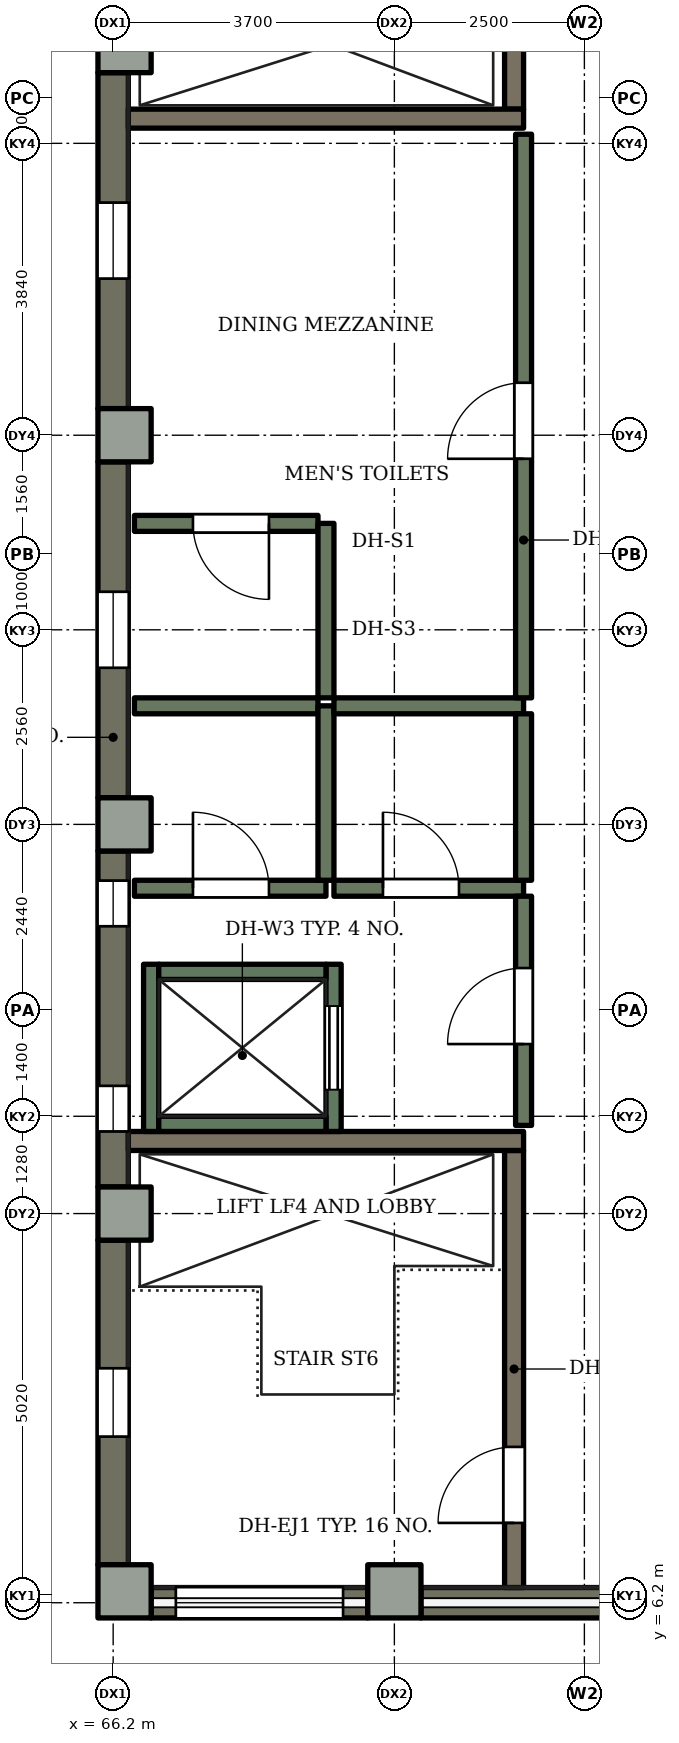
"""IFC4 building model, lengths in metres.
Left out: names, types, materials, properties, quantities, classifications, styles, units other than length and angle.
Written with IfcOpenShell. Run it as: python <this file> out.ifc"""

import sys

from ifc_helpers import new_model, si_unit, direction, frame, frame_2d, origin, origin_2d, place, context, subcontext, project, spatial, rectangle, extrude, element, fill, save


model = new_model("IFC4")
c1 = context("Model", 3, precision=1e-05, world=origin(), true_north=direction((0.0, 1.0)))
c2 = subcontext(c1, "Body", "Model", "MODEL_VIEW")
j1 = project(units=[si_unit("LENGTHUNIT", "METRE"), si_unit("PLANEANGLEUNIT", "RADIAN")], contexts=[c1])
p1 = place(None, origin())
s1 = spatial("IfcSite", under=j1, at=p1, CompositionType="ELEMENT")
p2 = place(p1, origin())
s2 = spatial("IfcBuilding", under=s1, at=p2, CompositionType="ELEMENT")
p3 = place(p2, frame((0.0, 0.0, 4.2)))
s3 = spatial("IfcBuildingStorey", under=s2, at=p3, CompositionType="ELEMENT", Elevation=4.2)
p4 = place(p3, frame((66.35, 6.35, 0.0), z_axis=(0.0, 0.0, 1.0), x_axis=(1.0, 0.0, 0.0)))
e1 = element("IfcColumn", 1, at=p4, inside=s3, PredefinedType="COLUMN", context=c2, shape_type="SweptSolid", body=[
    extrude(rectangle(XDim=0.7, YDim=0.7, at=origin_2d()), origin(), (0.0, 0.0, 1.0), 4.2),
])
p5 = place(p3, frame((69.9, 6.35, 0.0), z_axis=(0.0, 0.0, 1.0), x_axis=(1.0, 0.0, 0.0)))
e2 = element("IfcColumn", 2, at=p5, inside=s3, PredefinedType="COLUMN", context=c2, shape_type="SweptSolid", body=[
    extrude(rectangle(XDim=0.7, YDim=0.7, at=origin_2d()), origin(), (0.0, 0.0, 1.0), 3.3),
])
for number, where, z_axis, x_axis in (
    (3, (66.35, 11.32, 0.0), (0.0, 0.0, 1.0), (1.0, 0.0, 0.0)),
    (4, (66.35, 16.44, 0.0), (0.0, 0.0, 1.0), (1.0, 0.0, 0.0)),
    (5, (66.35, 21.56, 0.0), (0.0, 0.0, 1.0), (1.0, 0.0, 0.0)),
    (6, (66.35, 26.68, 0.0), (0.0, 0.0, 1.0), (1.0, 0.0, 0.0)),
):
    element("IfcColumn", number, at=place(p3, frame(where, z_axis=z_axis, x_axis=x_axis)), inside=s3, PredefinedType="COLUMN", context=c2, shape_type="SweptSolid", body=[
        extrude(rectangle(XDim=0.7, YDim=0.7, at=origin_2d()), origin(), (0.0, 0.0, 1.0), 4.2),
    ])
p6 = place(p3, frame((69.55, 6.2, 0.0), z_axis=(0.0, 0.0, 1.0), x_axis=(-1.0, 0.0, 0.0)))
e7 = element("IfcWall", 7, at=p6, inside=s3, PredefinedType="SOLIDWALL", context=c2, shape_type="SweptSolid", body=[
    extrude(rectangle(XDim=2.85, YDim=0.4, at=frame_2d((1.425, 0.0))), origin(), (0.0, 0.0, 1.0), 3.3),
])
p7 = place(p6, frame((0.325, 0.0, 0.6)))
e8 = element("IfcOpeningElement", 8, at=p7, cuts=e7, PredefinedType="OPENING", context=c2, shape_type="SweptSolid", body=[
    extrude(rectangle(XDim=2.2, YDim=2.4, at=frame_2d((1.1, 1.2))), frame((0.0, 0.21, 0.0), z_axis=(0.0, -1.0, 0.0), x_axis=(1.0, 0.0, 0.0)), (0.0, 0.0, 1.0), 0.42),
])
p8 = place(p3, frame((73.25, 6.2, 0.0), z_axis=(0.0, 0.0, 1.0), x_axis=(-1.0, 0.0, 0.0)))
e9 = element("IfcWall", 9, at=p8, inside=s3, PredefinedType="SOLIDWALL", context=c2, shape_type="SweptSolid", body=[
    extrude(rectangle(XDim=3.0, YDim=0.4, at=frame_2d((1.5, 0.0))), origin(), (0.0, 0.0, 1.0), 3.3),
])
p9 = place(p3, frame((66.2, 6.7, 0.0), z_axis=(0.0, 0.0, 1.0), x_axis=(0.0, 1.0, 0.0)))
e10 = element("IfcWall", 10, at=p9, inside=s3, PredefinedType="SOLIDWALL", context=c2, shape_type="SweptSolid", body=[
    extrude(rectangle(XDim=4.27, YDim=0.4, at=frame_2d((2.135, 0.0))), origin(), (0.0, 0.0, 1.0), 4.2),
])
p10 = place(p9, frame((1.685, 0.0, 0.9)))
e11 = element("IfcOpeningElement", 11, at=p10, cuts=e10, PredefinedType="OPENING", context=c2, shape_type="SweptSolid", body=[
    extrude(rectangle(XDim=0.9, YDim=1.8, at=frame_2d((0.45, 0.9))), frame((0.0, 0.21, 0.0), z_axis=(0.0, -1.0, 0.0), x_axis=(1.0, 0.0, 0.0)), (0.0, 0.0, 1.0), 0.42),
])
p11 = place(p3, frame((66.2, 11.67, 0.0), z_axis=(0.0, 0.0, 1.0), x_axis=(0.0, 1.0, 0.0)))
e12 = element("IfcWall", 12, at=p11, inside=s3, PredefinedType="SOLIDWALL", context=c2, shape_type="SweptSolid", body=[
    extrude(rectangle(XDim=4.42, YDim=0.4, at=frame_2d((2.21, 0.0))), origin(), (0.0, 0.0, 1.0), 4.2),
])
p12 = place(p11, frame((0.73, 0.0, 1.5)))
e13 = element("IfcOpeningElement", 13, at=p12, cuts=e12, PredefinedType="OPENING", context=c2, shape_type="SweptSolid", body=[
    extrude(rectangle(XDim=0.6, YDim=1.2, at=frame_2d((0.3, 0.6))), frame((0.0, 0.21, 0.0), z_axis=(0.0, -1.0, 0.0), x_axis=(1.0, 0.0, 0.0)), (0.0, 0.0, 1.0), 0.42),
])
p13 = place(p11, frame((3.43, 0.0, 1.5)))
e14 = element("IfcOpeningElement", 14, at=p13, cuts=e12, PredefinedType="OPENING", context=c2, shape_type="SweptSolid", body=[
    extrude(rectangle(XDim=0.6, YDim=1.2, at=frame_2d((0.3, 0.6))), frame((0.0, 0.21, 0.0), z_axis=(0.0, -1.0, 0.0), x_axis=(1.0, 0.0, 0.0)), (0.0, 0.0, 1.0), 0.42),
])
p14 = place(p3, frame((66.2, 16.79, 0.0), z_axis=(0.0, 0.0, 1.0), x_axis=(0.0, 1.0, 0.0)))
e15 = element("IfcWall", 15, at=p14, inside=s3, PredefinedType="SOLIDWALL", context=c2, shape_type="SweptSolid", body=[
    extrude(rectangle(XDim=4.42, YDim=0.4, at=frame_2d((2.21, 0.0))), origin(), (0.0, 0.0, 1.0), 4.2),
])
p15 = place(p14, frame((1.71, 0.0, 0.6)))
e16 = element("IfcOpeningElement", 16, at=p15, cuts=e15, PredefinedType="OPENING", context=c2, shape_type="SweptSolid", body=[
    extrude(rectangle(XDim=1.0, YDim=2.4, at=frame_2d((0.5, 1.2))), frame((0.0, 0.21, 0.0), z_axis=(0.0, -1.0, 0.0), x_axis=(1.0, 0.0, 0.0)), (0.0, 0.0, 1.0), 0.42),
])
p16 = place(p3, frame((66.2, 21.91, 0.0), z_axis=(0.0, 0.0, 1.0), x_axis=(0.0, 1.0, 0.0)))
e17 = element("IfcWall", 17, at=p16, inside=s3, PredefinedType="SOLIDWALL", context=c2, shape_type="SweptSolid", body=[
    extrude(rectangle(XDim=4.42, YDim=0.4, at=frame_2d((2.21, 0.0))), origin(), (0.0, 0.0, 1.0), 4.2),
])
p17 = place(p16, frame((1.71, 0.0, 0.6)))
e18 = element("IfcOpeningElement", 18, at=p17, cuts=e17, PredefinedType="OPENING", context=c2, shape_type="SweptSolid", body=[
    extrude(rectangle(XDim=1.0, YDim=2.4, at=frame_2d((0.5, 1.2))), frame((0.0, 0.21, 0.0), z_axis=(0.0, -1.0, 0.0), x_axis=(1.0, 0.0, 0.0)), (0.0, 0.0, 1.0), 0.42),
])
p18 = place(p3, frame((71.475, 6.4, 0.0), z_axis=(0.0, 0.0, 1.0), x_axis=(0.0, 1.0, 0.0)))
e19 = element("IfcWall", 19, at=p18, inside=s3, PredefinedType="SHEAR", context=c2, shape_type="SweptSolid", body=[
    extrude(rectangle(XDim=5.75, YDim=0.25, at=frame_2d((2.875, 0.0))), origin(), (0.0, 0.0, 1.0), 3.1),
])
p19 = place(p18, frame((0.85, 0.0, 0.0)))
e20 = element("IfcOpeningElement", 20, at=p19, cuts=e19, PredefinedType="OPENING", context=c2, shape_type="SweptSolid", body=[
    extrude(rectangle(XDim=1.0, YDim=2.1, at=frame_2d((0.5, 1.05))), frame((0.0, 0.135, 0.0), z_axis=(0.0, -1.0, 0.0), x_axis=(1.0, 0.0, 0.0)), (0.0, 0.0, 1.0), 0.27),
])
p20 = place(p3, frame((66.4, 12.275, 0.0), z_axis=(0.0, 0.0, 1.0), x_axis=(1.0, 0.0, 0.0)))
e21 = element("IfcWall", 21, at=p20, inside=s3, PredefinedType="SHEAR", context=c2, shape_type="SweptSolid", body=[
    extrude(rectangle(XDim=5.2, YDim=0.25, at=frame_2d((2.6, 0.0))), origin(), (0.0, 0.0, 1.0), 3.1),
])
p21 = place(p3, frame((71.475, 25.85, 0.0), z_axis=(0.0, 0.0, 1.0), x_axis=(0.0, 1.0, 0.0)))
e22 = element("IfcWall", 22, at=p21, inside=s3, PredefinedType="SHEAR", context=c2, shape_type="SweptSolid", body=[
    extrude(rectangle(XDim=5.75, YDim=0.25, at=frame_2d((2.875, 0.0))), origin(), (0.0, 0.0, 1.0), 3.1),
])
p22 = place(p21, frame((3.914, 0.0, 0.0)))
e23 = element("IfcOpeningElement", 23, at=p22, cuts=e22, PredefinedType="OPENING", context=c2, shape_type="SweptSolid", body=[
    extrude(rectangle(XDim=1.0, YDim=2.1, at=frame_2d((0.5, 1.05))), frame((0.0, 0.135, 0.0), z_axis=(0.0, -1.0, 0.0), x_axis=(1.0, 0.0, 0.0)), (0.0, 0.0, 1.0), 0.27),
])
p23 = place(p3, frame((66.4, 25.725, 0.0), z_axis=(0.0, 0.0, 1.0), x_axis=(1.0, 0.0, 0.0)))
e24 = element("IfcWall", 24, at=p23, inside=s3, PredefinedType="SHEAR", context=c2, shape_type="SweptSolid", body=[
    extrude(rectangle(XDim=5.2, YDim=0.25, at=frame_2d((2.6, 0.0))), origin(), (0.0, 0.0, 1.0), 3.1),
])
p24 = place(p3, frame((66.7, 12.4, 0.0), z_axis=(0.0, 0.0, 1.0), x_axis=(0.0, 1.0, 0.0)))
e25 = element("IfcWall", 25, at=p24, inside=s3, PredefinedType="SHEAR", context=c2, shape_type="SweptSolid", body=[
    extrude(rectangle(XDim=2.2, YDim=0.2, at=frame_2d((1.1, 0.0))), origin(), (0.0, 0.0, 1.0), 3.1),
])
p25 = place(p3, frame((69.1, 12.4, 0.0), z_axis=(0.0, 0.0, 1.0), x_axis=(0.0, 1.0, 0.0)))
e26 = element("IfcWall", 26, at=p25, inside=s3, PredefinedType="SHEAR", context=c2, shape_type="SweptSolid", body=[
    extrude(rectangle(XDim=2.2, YDim=0.2, at=frame_2d((1.1, 0.0))), origin(), (0.0, 0.0, 1.0), 3.1),
])
p26 = place(p25, frame((0.55, 0.0, 0.0)))
e27 = element("IfcOpeningElement", 27, at=p26, cuts=e26, PredefinedType="OPENING", context=c2, shape_type="SweptSolid", body=[
    extrude(rectangle(XDim=1.1, YDim=2.1, at=frame_2d((0.55, 1.05))), frame((0.0, 0.11, 0.0), z_axis=(0.0, -1.0, 0.0), x_axis=(1.0, 0.0, 0.0)), (0.0, 0.0, 1.0), 0.22),
])
for number, where, z_axis, x_axis in (
    (28, (66.8, 12.5, 0.0), (0.0, 0.0, 1.0), (1.0, 0.0, 0.0)),
    (29, (66.8, 14.5, 0.0), (0.0, 0.0, 1.0), (1.0, 0.0, 0.0)),
):
    element("IfcWall", number, at=place(p3, frame(where, z_axis=z_axis, x_axis=x_axis)), inside=s3, PredefinedType="SHEAR", context=c2, shape_type="SweptSolid", body=[
        extrude(rectangle(XDim=2.2, YDim=0.2, at=frame_2d((1.1, 0.0))), origin(), (0.0, 0.0, 1.0), 3.1),
    ])
for number, where, z_axis, x_axis in (
    (30, (66.4, 11.59, 0.0), (0.0, 0.0, 1.0), (0.0, -1.0, 0.0)),
    (31, (66.4, 16.71, 0.0), (0.0, 0.0, 1.0), (0.0, -1.0, 0.0)),
    (32, (66.4, 21.83, 0.0), (0.0, 0.0, 1.0), (0.0, -1.0, 0.0)),
    (33, (66.4, 26.95, 0.0), (0.0, 0.0, 1.0), (0.0, -1.0, 0.0)),
):
    element("IfcWall", number, at=place(p3, frame(where, z_axis=z_axis, x_axis=x_axis)), inside=s3, PredefinedType="PARTITIONING", context=c2, shape_type="SweptSolid", body=[
        extrude(rectangle(XDim=0.54, YDim=0.21, at=frame_2d((0.27, 0.0))), origin(), (0.0, 0.0, 1.0), 3.1),
    ])
p27 = place(p3, frame((66.48, 15.6, 0.0), z_axis=(0.0, 0.0, 1.0), x_axis=(1.0, 0.0, 0.0)))
e34 = element("IfcWall", 34, at=p27, inside=s3, PredefinedType="PARTITIONING", context=c2, shape_type="SweptSolid", body=[
    extrude(rectangle(XDim=2.52, YDim=0.21, at=frame_2d((1.26, 0.0))), origin(), (0.0, 0.0, 1.0), 3.1),
])
p28 = place(p27, frame((0.77, 0.0, 0.0)))
e35 = element("IfcOpeningElement", 35, at=p28, cuts=e34, PredefinedType="OPENING", context=c2, shape_type="SweptSolid", body=[
    extrude(rectangle(XDim=1.0, YDim=2.1, at=frame_2d((0.5, 1.05))), frame((0.0, 0.115, 0.0), z_axis=(0.0, -1.0, 0.0), x_axis=(1.0, 0.0, 0.0)), (0.0, 0.0, 1.0), 0.23),
])
p29 = place(p3, frame((68.895, 18.0, 0.0), z_axis=(0.0, 0.0, 1.0), x_axis=(-1.0, 0.0, 0.0)))
e36 = element("IfcWall", 36, at=p29, inside=s3, PredefinedType="PARTITIONING", context=c2, shape_type="SweptSolid", body=[
    extrude(rectangle(XDim=2.415, YDim=0.21, at=frame_2d((1.208, 0.0))), origin(), (0.0, 0.0, 1.0), 3.1),
])
p30 = place(p3, frame((68.895, 20.4, 0.0), z_axis=(0.0, 0.0, 1.0), x_axis=(-1.0, 0.0, 0.0)))
e37 = element("IfcWall", 37, at=p30, inside=s3, PredefinedType="PARTITIONING", context=c2, shape_type="SweptSolid", body=[
    extrude(rectangle(XDim=2.415, YDim=0.21, at=frame_2d((1.208, 0.0))), origin(), (0.0, 0.0, 1.0), 3.1),
])
p31 = place(p30, frame((0.645, 0.0, 0.0)))
e38 = element("IfcOpeningElement", 38, at=p31, cuts=e37, PredefinedType="OPENING", context=c2, shape_type="SweptSolid", body=[
    extrude(rectangle(XDim=1.0, YDim=2.1, at=frame_2d((0.5, 1.05))), frame((0.0, 0.115, 0.0), z_axis=(0.0, -1.0, 0.0), x_axis=(1.0, 0.0, 0.0)), (0.0, 0.0, 1.0), 0.23),
])
for number, where, z_axis, x_axis in (
    (39, (69.0, 15.705, 0.0), (0.0, 0.0, 1.0), (0.0, 1.0, 0.0)),
    (40, (69.0, 18.105, 0.0), (0.0, 0.0, 1.0), (0.0, 1.0, 0.0)),
):
    element("IfcWall", number, at=place(p3, frame(where, z_axis=z_axis, x_axis=x_axis)), inside=s3, PredefinedType="PARTITIONING", context=c2, shape_type="SweptSolid", body=[
        extrude(rectangle(XDim=2.295, YDim=0.21, at=frame_2d((1.147, 0.0))), origin(), (0.0, 0.0, 1.0), 3.1),
    ])
p32 = place(p3, frame((69.105, 15.6, 0.0), z_axis=(0.0, 0.0, 1.0), x_axis=(1.0, 0.0, 0.0)))
e41 = element("IfcWall", 41, at=p32, inside=s3, PredefinedType="PARTITIONING", context=c2, shape_type="SweptSolid", body=[
    extrude(rectangle(XDim=2.495, YDim=0.21, at=frame_2d((1.248, 0.0))), origin(), (0.0, 0.0, 1.0), 3.1),
])
p33 = place(p32, frame((0.645, 0.0, 0.0)))
e42 = element("IfcOpeningElement", 42, at=p33, cuts=e41, PredefinedType="OPENING", context=c2, shape_type="SweptSolid", body=[
    extrude(rectangle(XDim=1.0, YDim=2.1, at=frame_2d((0.5, 1.05))), frame((0.0, 0.115, 0.0), z_axis=(0.0, -1.0, 0.0), x_axis=(1.0, 0.0, 0.0)), (0.0, 0.0, 1.0), 0.23),
])
p34 = place(p3, frame((69.105, 18.0, 0.0), z_axis=(0.0, 0.0, 1.0), x_axis=(1.0, 0.0, 0.0)))
e43 = element("IfcWall", 43, at=p34, inside=s3, PredefinedType="PARTITIONING", context=c2, shape_type="SweptSolid", body=[
    extrude(rectangle(XDim=2.495, YDim=0.21, at=frame_2d((1.248, 0.0))), origin(), (0.0, 0.0, 1.0), 3.1),
])
p35 = place(p3, frame((69.63, 6.4, 0.0), z_axis=(0.0, 0.0, 1.0), x_axis=(1.0, 0.0, 0.0)))
e44 = element("IfcWall", 44, at=p35, inside=s3, PredefinedType="PARTITIONING", context=c2, shape_type="SweptSolid", body=[
    extrude(rectangle(XDim=0.54, YDim=0.21, at=frame_2d((0.27, 0.0))), origin(), (0.0, 0.0, 1.0), 3.1),
])
p36 = place(p3, frame((71.6, 12.48, 0.0), z_axis=(0.0, 0.0, 1.0), x_axis=(0.0, 1.0, 0.0)))
e45 = element("IfcWall", 45, at=p36, inside=s3, PredefinedType="PARTITIONING", context=c2, shape_type="SweptSolid", body=[
    extrude(rectangle(XDim=3.015, YDim=0.21, at=frame_2d((1.508, 0.0))), origin(), (0.0, 0.0, 1.0), 3.1),
])
p37 = place(p36, frame((1.07, 0.0, 0.0)))
e46 = element("IfcOpeningElement", 46, at=p37, cuts=e45, PredefinedType="OPENING", context=c2, shape_type="SweptSolid", body=[
    extrude(rectangle(XDim=1.0, YDim=2.1, at=frame_2d((0.5, 1.05))), frame((0.0, 0.115, 0.0), z_axis=(0.0, -1.0, 0.0), x_axis=(1.0, 0.0, 0.0)), (0.0, 0.0, 1.0), 0.23),
])
p38 = place(p3, frame((71.6, 15.705, 0.0), z_axis=(0.0, 0.0, 1.0), x_axis=(0.0, 1.0, 0.0)))
e47 = element("IfcWall", 47, at=p38, inside=s3, PredefinedType="PARTITIONING", context=c2, shape_type="SweptSolid", body=[
    extrude(rectangle(XDim=2.19, YDim=0.21, at=frame_2d((1.095, 0.0))), origin(), (0.0, 0.0, 1.0), 3.1),
])
p39 = place(p3, frame((71.6, 18.105, 0.0), z_axis=(0.0, 0.0, 1.0), x_axis=(0.0, 1.0, 0.0)))
e48 = element("IfcWall", 48, at=p39, inside=s3, PredefinedType="PARTITIONING", context=c2, shape_type="SweptSolid", body=[
    extrude(rectangle(XDim=7.415, YDim=0.21, at=frame_2d((3.708, 0.0))), origin(), (0.0, 0.0, 1.0), 3.1),
])
p40 = place(p39, frame((3.145, 0.0, 0.0)))
e49 = element("IfcOpeningElement", 49, at=p40, cuts=e48, PredefinedType="OPENING", context=c2, shape_type="SweptSolid", body=[
    extrude(rectangle(XDim=1.0, YDim=2.1, at=frame_2d((0.5, 1.05))), frame((0.0, 0.115, 0.0), z_axis=(0.0, -1.0, 0.0), x_axis=(1.0, 0.0, 0.0)), (0.0, 0.0, 1.0), 0.23),
])
p41 = place(p7, origin())
e50 = element("IfcWindow", 50, at=p41, inside=s3, PartitioningType="SINGLE_PANEL", PredefinedType="WINDOW", context=c2, shape_type="SweptSolid", body=[
    extrude(rectangle(XDim=2.2, YDim=2.4, at=frame_2d((1.1, 1.2))), frame((0.0, 0.03, 0.0), z_axis=(0.0, -1.0, 0.0), x_axis=(1.0, 0.0, 0.0)), (0.0, 0.0, 1.0), 0.06),
])
fill(e8, e50)
p42 = place(p10, origin())
e51 = element("IfcWindow", 51, at=p42, inside=s3, PartitioningType="SINGLE_PANEL", PredefinedType="WINDOW", context=c2, shape_type="SweptSolid", body=[
    extrude(rectangle(XDim=0.9, YDim=1.8, at=frame_2d((0.45, 0.9))), frame((0.0, 0.03, 0.0), z_axis=(0.0, -1.0, 0.0), x_axis=(1.0, 0.0, 0.0)), (0.0, 0.0, 1.0), 0.06),
])
fill(e11, e51)
p43 = place(p12, origin())
e52 = element("IfcWindow", 52, at=p43, inside=s3, PartitioningType="SINGLE_PANEL", PredefinedType="WINDOW", context=c2, shape_type="SweptSolid", body=[
    extrude(rectangle(XDim=0.6, YDim=1.2, at=frame_2d((0.3, 0.6))), frame((0.0, 0.03, 0.0), z_axis=(0.0, -1.0, 0.0), x_axis=(1.0, 0.0, 0.0)), (0.0, 0.0, 1.0), 0.06),
])
fill(e13, e52)
p44 = place(p13, origin())
e53 = element("IfcWindow", 53, at=p44, inside=s3, PartitioningType="SINGLE_PANEL", PredefinedType="WINDOW", context=c2, shape_type="SweptSolid", body=[
    extrude(rectangle(XDim=0.6, YDim=1.2, at=frame_2d((0.3, 0.6))), frame((0.0, 0.03, 0.0), z_axis=(0.0, -1.0, 0.0), x_axis=(1.0, 0.0, 0.0)), (0.0, 0.0, 1.0), 0.06),
])
fill(e14, e53)
p45 = place(p15, origin())
e54 = element("IfcWindow", 54, at=p45, inside=s3, PartitioningType="SINGLE_PANEL", PredefinedType="WINDOW", context=c2, shape_type="SweptSolid", body=[
    extrude(rectangle(XDim=1.0, YDim=2.4, at=frame_2d((0.5, 1.2))), frame((0.0, 0.03, 0.0), z_axis=(0.0, -1.0, 0.0), x_axis=(1.0, 0.0, 0.0)), (0.0, 0.0, 1.0), 0.06),
])
fill(e16, e54)
p46 = place(p17, origin())
e55 = element("IfcWindow", 55, at=p46, inside=s3, PartitioningType="SINGLE_PANEL", PredefinedType="WINDOW", context=c2, shape_type="SweptSolid", body=[
    extrude(rectangle(XDim=1.0, YDim=2.4, at=frame_2d((0.5, 1.2))), frame((0.0, 0.03, 0.0), z_axis=(0.0, -1.0, 0.0), x_axis=(1.0, 0.0, 0.0)), (0.0, 0.0, 1.0), 0.06),
])
fill(e18, e55)
p47 = place(p26, origin())
e56 = element("IfcDoor", 56, at=p47, inside=s3, OperationType="SLIDING_TO_LEFT", PredefinedType="DOOR", context=c2, shape_type="SweptSolid", body=[
    extrude(rectangle(XDim=1.1, YDim=2.1, at=frame_2d((0.55, 1.05))), frame((0.0, 0.025, 0.0), z_axis=(0.0, -1.0, 0.0), x_axis=(1.0, 0.0, 0.0)), (0.0, 0.0, 1.0), 0.05),
])
fill(e27, e56)
p48 = place(p19, origin())
e57 = element("IfcDoor", 57, at=p48, inside=s3, OperationType="SINGLE_SWING_LEFT", PredefinedType="DOOR", context=c2, shape_type="SweptSolid", body=[
    extrude(rectangle(XDim=1.0, YDim=2.1, at=frame_2d((0.5, 1.05))), frame((0.0, 0.025, 0.0), z_axis=(0.0, -1.0, 0.0), x_axis=(1.0, 0.0, 0.0)), (0.0, 0.0, 1.0), 0.05),
])
fill(e20, e57)
p49 = place(p28, origin())
e58 = element("IfcDoor", 58, at=p49, inside=s3, OperationType="SINGLE_SWING_LEFT", PredefinedType="DOOR", context=c2, shape_type="SweptSolid", body=[
    extrude(rectangle(XDim=1.0, YDim=2.1, at=frame_2d((0.5, 1.05))), frame((0.0, 0.025, 0.0), z_axis=(0.0, -1.0, 0.0), x_axis=(1.0, 0.0, 0.0)), (0.0, 0.0, 1.0), 0.05),
])
fill(e35, e58)
p50 = place(p31, origin())
e59 = element("IfcDoor", 59, at=p50, inside=s3, OperationType="SINGLE_SWING_LEFT", PredefinedType="DOOR", context=c2, shape_type="SweptSolid", body=[
    extrude(rectangle(XDim=1.0, YDim=2.1, at=frame_2d((0.5, 1.05))), frame((0.0, 0.025, 0.0), z_axis=(0.0, -1.0, 0.0), x_axis=(1.0, 0.0, 0.0)), (0.0, 0.0, 1.0), 0.05),
])
fill(e38, e59)
p51 = place(p40, origin())
e60 = element("IfcDoor", 60, at=p51, inside=s3, OperationType="SINGLE_SWING_LEFT", PredefinedType="DOOR", context=c2, shape_type="SweptSolid", body=[
    extrude(rectangle(XDim=1.0, YDim=2.1, at=frame_2d((0.5, 1.05))), frame((0.0, 0.025, 0.0), z_axis=(0.0, -1.0, 0.0), x_axis=(1.0, 0.0, 0.0)), (0.0, 0.0, 1.0), 0.05),
])
fill(e49, e60)
p52 = place(p33, origin())
e61 = element("IfcDoor", 61, at=p52, inside=s3, OperationType="SINGLE_SWING_LEFT", PredefinedType="DOOR", context=c2, shape_type="SweptSolid", body=[
    extrude(rectangle(XDim=1.0, YDim=2.1, at=frame_2d((0.5, 1.05))), frame((0.0, 0.025, 0.0), z_axis=(0.0, -1.0, 0.0), x_axis=(1.0, 0.0, 0.0)), (0.0, 0.0, 1.0), 0.05),
])
fill(e42, e61)
p53 = place(p37, origin())
e62 = element("IfcDoor", 62, at=p53, inside=s3, OperationType="SINGLE_SWING_LEFT", PredefinedType="DOOR", context=c2, shape_type="SweptSolid", body=[
    extrude(rectangle(XDim=1.0, YDim=2.1, at=frame_2d((0.5, 1.05))), frame((0.0, 0.025, 0.0), z_axis=(0.0, -1.0, 0.0), x_axis=(1.0, 0.0, 0.0)), (0.0, 0.0, 1.0), 0.05),
])
fill(e46, e62)
save(model, sys.argv[1])
